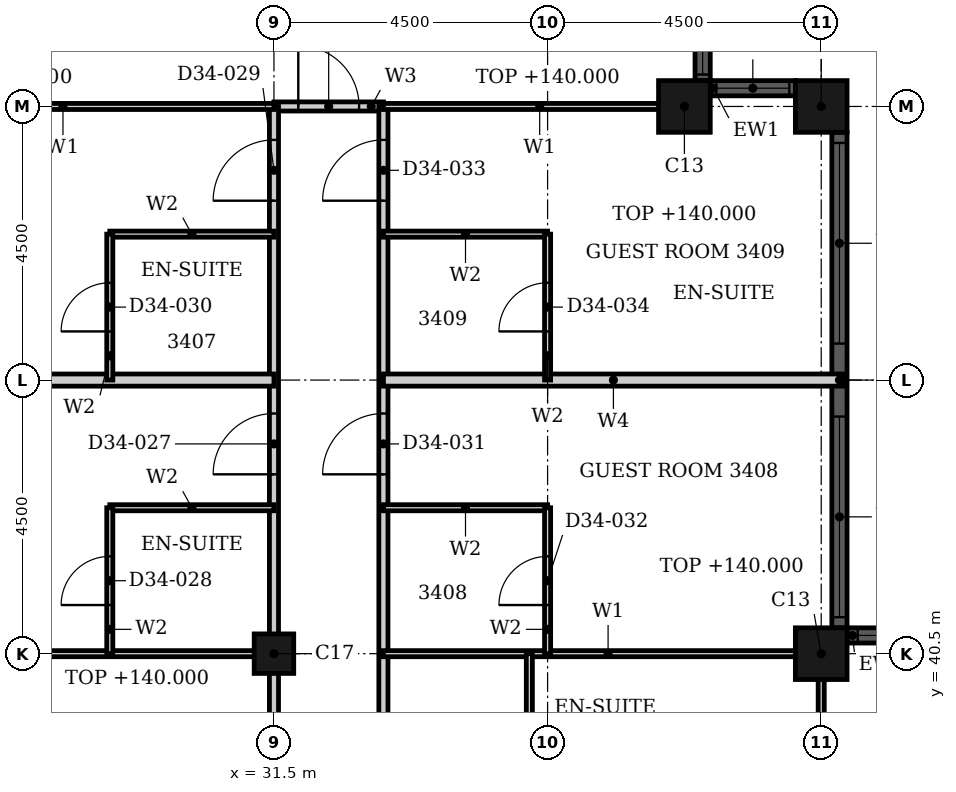
"""IFC4 building model, lengths in metres.
Left out: names, types, materials, properties, quantities, classifications, styles, units other than length and angle.
Written with IfcOpenShell. Run it as: python <this file> out.ifc"""

import sys

from ifc_helpers import new_model, si_unit, direction, frame, frame_2d, origin, origin_2d, place, context, subcontext, project, spatial, rectangle, hollow_rectangle, extrude, element, fill, save


model = new_model("IFC4")
c1 = context("Model", 3, precision=1e-05, world=origin(), true_north=direction((0.0, 1.0)))
c2 = subcontext(c1, "Body", "Model", "MODEL_VIEW")
j1 = project(units=[si_unit("LENGTHUNIT", "METRE"), si_unit("PLANEANGLEUNIT", "RADIAN")], contexts=[c1])
p1 = place(None, origin())
s1 = spatial("IfcSite", under=j1, at=p1, CompositionType="ELEMENT")
p2 = place(p1, origin())
s2 = spatial("IfcBuilding", under=s1, at=p2, CompositionType="ELEMENT")
p3 = place(p2, frame((0.0, 0.0, 136.8)))
s3 = spatial("IfcBuildingStorey", under=s2, at=p3, CompositionType="ELEMENT", Elevation=136.8)
for number, where, z_axis, x_axis in (
    (1, (40.5, 40.5, 0.0), (0.0, 0.0, 1.0), (1.0, 0.0, 0.0)),
    (2, (40.5, 49.5, 0.0), (0.0, 0.0, 1.0), (1.0, 0.0, 0.0)),
    (3, (38.25, 49.5, 0.0), (0.0, 0.0, 1.0), (1.0, 0.0, 0.0)),
):
    element("IfcColumn", number, at=place(p3, frame(where, z_axis=z_axis, x_axis=x_axis)), inside=s3, PredefinedType="COLUMN", context=c2, shape_type="SweptSolid", body=[
        extrude(hollow_rectangle(XDim=0.85, YDim=0.85, WallThickness=0.026, at=origin_2d()), origin(), (0.0, 0.0, 1.0), 3.2),
    ])
p4 = place(p3, frame((31.5, 40.5, 0.0), z_axis=(0.0, 0.0, 1.0), x_axis=(1.0, 0.0, 0.0)))
e4 = element("IfcColumn", 4, at=p4, inside=s3, PredefinedType="COLUMN", context=c2, shape_type="SweptSolid", body=[
    extrude(hollow_rectangle(XDim=0.65, YDim=0.65, WallThickness=0.021, at=origin_2d()), origin(), (0.0, 0.0, 1.0), 3.2),
])
p5 = place(p3, frame((44.575, 40.8, 0.0), z_axis=(0.0, 0.0, 1.0), x_axis=(-1.0, 0.0, 0.0)))
e5 = element("IfcWall", 5, at=p5, inside=s3, PredefinedType="SOLIDWALL", context=c2, shape_type="SweptSolid", body=[
    extrude(rectangle(XDim=3.65, YDim=0.25, at=frame_2d((1.825, 0.0))), origin(), (0.0, 0.0, 1.0), 3.6),
])
p6 = place(p5, frame((0.175, 0.0, 0.9)))
e6 = element("IfcOpeningElement", 6, at=p6, cuts=e5, PredefinedType="OPENING", context=c2, shape_type="SweptSolid", body=[
    extrude(rectangle(XDim=3.3, YDim=1.35, at=frame_2d((1.65, 0.675))), frame((0.0, 0.135, 0.0), z_axis=(0.0, -1.0, 0.0), x_axis=(1.0, 0.0, 0.0)), (0.0, 0.0, 1.0), 0.27),
])
p7 = place(p3, frame((40.8, 40.925, 0.0), z_axis=(0.0, 0.0, 1.0), x_axis=(0.0, 1.0, 0.0)))
e7 = element("IfcWall", 7, at=p7, inside=s3, PredefinedType="SOLIDWALL", context=c2, shape_type="SweptSolid", body=[
    extrude(rectangle(XDim=8.15, YDim=0.25, at=frame_2d((4.075, 0.0))), origin(), (0.0, 0.0, 1.0), 3.6),
])
p8 = place(p7, frame((0.175, 0.0, 0.9)))
e8 = element("IfcOpeningElement", 8, at=p8, cuts=e7, PredefinedType="OPENING", context=c2, shape_type="SweptSolid", body=[
    extrude(rectangle(XDim=3.3, YDim=2.08, at=frame_2d((1.65, 1.04))), frame((0.0, 0.135, 0.0), z_axis=(0.0, -1.0, 0.0), x_axis=(1.0, 0.0, 0.0)), (0.0, 0.0, 1.0), 0.27),
])
p9 = place(p7, frame((4.675, 0.0, 0.9)))
e9 = element("IfcOpeningElement", 9, at=p9, cuts=e7, PredefinedType="OPENING", context=c2, shape_type="SweptSolid", body=[
    extrude(rectangle(XDim=3.3, YDim=2.08, at=frame_2d((1.65, 1.04))), frame((0.0, 0.135, 0.0), z_axis=(0.0, -1.0, 0.0), x_axis=(1.0, 0.0, 0.0)), (0.0, 0.0, 1.0), 0.27),
])
p10 = place(p3, frame((40.075, 49.8, 0.0), z_axis=(0.0, 0.0, 1.0), x_axis=(-1.0, 0.0, 0.0)))
e10 = element("IfcWall", 10, at=p10, inside=s3, PredefinedType="SOLIDWALL", context=c2, shape_type="SweptSolid", body=[
    extrude(rectangle(XDim=1.4, YDim=0.25, at=frame_2d((0.7, 0.0))), origin(), (0.0, 0.0, 1.0), 3.6),
])
p11 = place(p10, frame((0.1, 0.0, 0.9)))
e11 = element("IfcOpeningElement", 11, at=p11, cuts=e10, PredefinedType="OPENING", context=c2, shape_type="SweptSolid", body=[
    extrude(rectangle(XDim=1.2, YDim=2.08, at=frame_2d((0.6, 1.04))), frame((0.0, 0.135, 0.0), z_axis=(0.0, -1.0, 0.0), x_axis=(1.0, 0.0, 0.0)), (0.0, 0.0, 1.0), 0.27),
])
p12 = place(p3, frame((38.55, 49.925, 0.0), z_axis=(0.0, 0.0, 1.0), x_axis=(0.0, 1.0, 0.0)))
e12 = element("IfcWall", 12, at=p12, inside=s3, PredefinedType="SOLIDWALL", context=c2, shape_type="SweptSolid", body=[
    extrude(rectangle(XDim=1.4, YDim=0.25, at=frame_2d((0.7, 0.0))), origin(), (0.0, 0.0, 1.0), 3.6),
])
p13 = place(p12, frame((0.1, 0.0, 0.9)))
e13 = element("IfcOpeningElement", 13, at=p13, cuts=e12, PredefinedType="OPENING", context=c2, shape_type="SweptSolid", body=[
    extrude(rectangle(XDim=1.2, YDim=2.08, at=frame_2d((0.6, 1.04))), frame((0.0, 0.135, 0.0), z_axis=(0.0, -1.0, 0.0), x_axis=(1.0, 0.0, 0.0)), (0.0, 0.0, 1.0), 0.27),
])
p14 = place(p3, frame((31.5, 49.5, 0.0), z_axis=(0.0, 0.0, 1.0), x_axis=(1.0, 0.0, 0.0)))
e14 = element("IfcWall", 14, at=p14, inside=s3, PredefinedType="PARTITIONING", context=c2, shape_type="SweptSolid", body=[
    extrude(rectangle(XDim=1.8, YDim=0.15, at=frame_2d((0.9, 0.0))), origin(), (0.0, 0.0, 1.0), 3.2),
])
p15 = place(p14, frame((0.4, 0.0, 0.0)))
e15 = element("IfcOpeningElement", 15, at=p15, cuts=e14, PredefinedType="OPENING", context=c2, shape_type="SweptSolid", body=[
    extrude(rectangle(XDim=1.0, YDim=2.1, at=frame_2d((0.5, 1.05))), frame((0.0, 0.085, 0.0), z_axis=(0.0, -1.0, 0.0), x_axis=(1.0, 0.0, 0.0)), (0.0, 0.0, 1.0), 0.17),
])
p16 = place(p3, frame((31.5, 33.3, 0.0), z_axis=(0.0, 0.0, 1.0), x_axis=(0.0, 1.0, 0.0)))
e16 = element("IfcWall", 16, at=p16, inside=s3, PredefinedType="PARTITIONING", context=c2, shape_type="SweptSolid", body=[
    extrude(rectangle(XDim=16.2, YDim=0.15, at=frame_2d((8.1, 0.0))), origin(), (0.0, 0.0, 1.0), 2.48),
])
p17 = place(p16, frame((10.15, 0.0, 0.0)))
e17 = element("IfcOpeningElement", 17, at=p17, cuts=e16, PredefinedType="OPENING", context=c2, shape_type="SweptSolid", body=[
    extrude(rectangle(XDim=1.0, YDim=2.1, at=frame_2d((0.5, 1.05))), frame((0.0, 0.085, 0.0), z_axis=(0.0, -1.0, 0.0), x_axis=(1.0, 0.0, 0.0)), (0.0, 0.0, 1.0), 0.17),
])
p18 = place(p16, frame((14.65, 0.0, 0.0)))
e18 = element("IfcOpeningElement", 18, at=p18, cuts=e16, PredefinedType="OPENING", context=c2, shape_type="SweptSolid", body=[
    extrude(rectangle(XDim=1.0, YDim=2.1, at=frame_2d((0.5, 1.05))), frame((0.0, 0.085, 0.0), z_axis=(0.0, -1.0, 0.0), x_axis=(1.0, 0.0, 0.0)), (0.0, 0.0, 1.0), 0.17),
])
p19 = place(p3, frame((33.3, 33.3, 0.0), z_axis=(0.0, 0.0, 1.0), x_axis=(0.0, 1.0, 0.0)))
e19 = element("IfcWall", 19, at=p19, inside=s3, PredefinedType="PARTITIONING", context=c2, shape_type="SweptSolid", body=[
    extrude(rectangle(XDim=16.2, YDim=0.15, at=frame_2d((8.1, 0.0))), origin(), (0.0, 0.0, 1.0), 3.2),
])
p20 = place(p19, frame((10.15, 0.0, 0.0)))
e20 = element("IfcOpeningElement", 20, at=p20, cuts=e19, PredefinedType="OPENING", context=c2, shape_type="SweptSolid", body=[
    extrude(rectangle(XDim=1.0, YDim=2.1, at=frame_2d((0.5, 1.05))), frame((0.0, 0.085, 0.0), z_axis=(0.0, -1.0, 0.0), x_axis=(1.0, 0.0, 0.0)), (0.0, 0.0, 1.0), 0.17),
])
p21 = place(p19, frame((14.65, 0.0, 0.0)))
e21 = element("IfcOpeningElement", 21, at=p21, cuts=e19, PredefinedType="OPENING", context=c2, shape_type="SweptSolid", body=[
    extrude(rectangle(XDim=1.0, YDim=2.1, at=frame_2d((0.5, 1.05))), frame((0.0, 0.085, 0.0), z_axis=(0.0, -1.0, 0.0), x_axis=(1.0, 0.0, 0.0)), (0.0, 0.0, 1.0), 0.17),
])
p22 = place(p3, frame((33.3, 40.5, 0.0), z_axis=(0.0, 0.0, 1.0), x_axis=(1.0, 0.0, 0.0)))
e22 = element("IfcWall", 22, at=p22, inside=s3, PredefinedType="PARTITIONING", context=c2, shape_type="SweptSolid", body=[
    extrude(rectangle(XDim=7.39, YDim=0.1, at=frame_2d((3.695, 0.0))), origin(), (0.0, 0.0, 1.0), 2.268),
])
p23 = place(p3, frame((22.31, 40.5, 0.0), z_axis=(0.0, 0.0, 1.0), x_axis=(1.0, 0.0, 0.0)))
e23 = element("IfcWall", 23, at=p23, inside=s3, PredefinedType="PARTITIONING", context=c2, shape_type="SweptSolid", body=[
    extrude(rectangle(XDim=9.19, YDim=0.1, at=frame_2d((4.595, 0.0))), origin(), (0.0, 0.0, 1.0), 2.268),
])
p24 = place(p3, frame((33.3, 49.5, 0.0), z_axis=(0.0, 0.0, 1.0), x_axis=(1.0, 0.0, 0.0)))
e24 = element("IfcWall", 24, at=p24, inside=s3, PredefinedType="PARTITIONING", context=c2, shape_type="SweptSolid", body=[
    extrude(rectangle(XDim=5.14, YDim=0.1, at=frame_2d((2.57, 0.0))), origin(), (0.0, 0.0, 1.0), 3.2),
])
p25 = place(p3, frame((24.56, 49.5, 0.0), z_axis=(0.0, 0.0, 1.0), x_axis=(1.0, 0.0, 0.0)))
e25 = element("IfcWall", 25, at=p25, inside=s3, PredefinedType="PARTITIONING", context=c2, shape_type="SweptSolid", body=[
    extrude(rectangle(XDim=6.94, YDim=0.1, at=frame_2d((3.47, 0.0))), origin(), (0.0, 0.0, 1.0), 3.2),
])
p26 = place(p3, frame((35.7, 33.3, 0.0), z_axis=(0.0, 0.0, 1.0), x_axis=(0.0, 1.0, 0.0)))
e26 = element("IfcWall", 26, at=p26, inside=s3, PredefinedType="PARTITIONING", context=c2, shape_type="SweptSolid", body=[
    extrude(rectangle(XDim=7.2, YDim=0.1, at=frame_2d((3.6, 0.0))), origin(), (0.0, 0.0, 1.0), 3.2),
])
p27 = place(p3, frame((40.5, 33.3, 0.0), z_axis=(0.0, 0.0, 1.0), x_axis=(0.0, 1.0, 0.0)))
e27 = element("IfcWall", 27, at=p27, inside=s3, PredefinedType="PARTITIONING", context=c2, shape_type="SweptSolid", body=[
    extrude(rectangle(XDim=7.39, YDim=0.1, at=frame_2d((3.695, 0.0))), origin(), (0.0, 0.0, 1.0), 3.2),
])
p28 = place(p3, frame((33.3, 45.0, 0.0), z_axis=(0.0, 0.0, 1.0), x_axis=(1.0, 0.0, 0.0)))
e28 = element("IfcWall", 28, at=p28, inside=s3, PredefinedType="PARTITIONING", context=c2, shape_type="SweptSolid", body=[
    extrude(rectangle(XDim=7.565, YDim=0.2, at=frame_2d((3.782, 0.0))), origin(), (0.0, 0.0, 1.0), 3.2),
])
p29 = place(p3, frame((22.135, 45.0, 0.0), z_axis=(0.0, 0.0, 1.0), x_axis=(1.0, 0.0, 0.0)))
e29 = element("IfcWall", 29, at=p29, inside=s3, PredefinedType="PARTITIONING", context=c2, shape_type="SweptSolid", body=[
    extrude(rectangle(XDim=9.365, YDim=0.2, at=frame_2d((4.683, 0.0))), origin(), (0.0, 0.0, 1.0), 3.2),
])
for number, where, z_axis, x_axis in (
    (30, (33.3, 42.9, 0.0), (0.0, 0.0, 1.0), (1.0, 0.0, 0.0)),
    (31, (28.8, 42.9, 0.0), (0.0, 0.0, 1.0), (1.0, 0.0, 0.0)),
    (32, (33.3, 47.4, 0.0), (0.0, 0.0, 1.0), (1.0, 0.0, 0.0)),
    (33, (28.8, 47.4, 0.0), (0.0, 0.0, 1.0), (1.0, 0.0, 0.0)),
):
    element("IfcWall", number, at=place(p3, frame(where, z_axis=z_axis, x_axis=x_axis)), inside=s3, PredefinedType="PARTITIONING", context=c2, shape_type="SweptSolid", body=[
        extrude(rectangle(XDim=2.7, YDim=0.1, at=frame_2d((1.35, 0.0))), origin(), (0.0, 0.0, 1.0), 3.2),
    ])
p30 = place(p3, frame((28.8, 40.5, 0.0), z_axis=(0.0, 0.0, 1.0), x_axis=(0.0, 1.0, 0.0)))
e34 = element("IfcWall", 34, at=p30, inside=s3, PredefinedType="PARTITIONING", context=c2, shape_type="SweptSolid", body=[
    extrude(rectangle(XDim=2.4, YDim=0.1, at=frame_2d((1.2, 0.0))), origin(), (0.0, 0.0, 1.0), 3.2),
])
p31 = place(p30, frame((0.8, 0.0, 0.0)))
e35 = element("IfcOpeningElement", 35, at=p31, cuts=e34, PredefinedType="OPENING", context=c2, shape_type="SweptSolid", body=[
    extrude(rectangle(XDim=0.8, YDim=2.1, at=frame_2d((0.4, 1.05))), frame((0.0, 0.06, 0.0), z_axis=(0.0, -1.0, 0.0), x_axis=(1.0, 0.0, 0.0)), (0.0, 0.0, 1.0), 0.12),
])
p32 = place(p3, frame((28.8, 45.0, 0.0), z_axis=(0.0, 0.0, 1.0), x_axis=(0.0, 1.0, 0.0)))
e36 = element("IfcWall", 36, at=p32, inside=s3, PredefinedType="PARTITIONING", context=c2, shape_type="SweptSolid", body=[
    extrude(rectangle(XDim=2.4, YDim=0.1, at=frame_2d((1.2, 0.0))), origin(), (0.0, 0.0, 1.0), 3.2),
])
p33 = place(p32, frame((0.8, 0.0, 0.0)))
e37 = element("IfcOpeningElement", 37, at=p33, cuts=e36, PredefinedType="OPENING", context=c2, shape_type="SweptSolid", body=[
    extrude(rectangle(XDim=0.8, YDim=2.1, at=frame_2d((0.4, 1.05))), frame((0.0, 0.06, 0.0), z_axis=(0.0, -1.0, 0.0), x_axis=(1.0, 0.0, 0.0)), (0.0, 0.0, 1.0), 0.12),
])
p34 = place(p3, frame((36.0, 40.5, 0.0), z_axis=(0.0, 0.0, 1.0), x_axis=(0.0, 1.0, 0.0)))
e38 = element("IfcWall", 38, at=p34, inside=s3, PredefinedType="PARTITIONING", context=c2, shape_type="SweptSolid", body=[
    extrude(rectangle(XDim=2.4, YDim=0.1, at=frame_2d((1.2, 0.0))), origin(), (0.0, 0.0, 1.0), 2.48),
])
p35 = place(p34, frame((0.8, 0.0, 0.0)))
e39 = element("IfcOpeningElement", 39, at=p35, cuts=e38, PredefinedType="OPENING", context=c2, shape_type="SweptSolid", body=[
    extrude(rectangle(XDim=0.8, YDim=2.1, at=frame_2d((0.4, 1.05))), frame((0.0, 0.06, 0.0), z_axis=(0.0, -1.0, 0.0), x_axis=(1.0, 0.0, 0.0)), (0.0, 0.0, 1.0), 0.12),
])
p36 = place(p3, frame((36.0, 45.0, 0.0), z_axis=(0.0, 0.0, 1.0), x_axis=(0.0, 1.0, 0.0)))
e40 = element("IfcWall", 40, at=p36, inside=s3, PredefinedType="PARTITIONING", context=c2, shape_type="SweptSolid", body=[
    extrude(rectangle(XDim=2.4, YDim=0.1, at=frame_2d((1.2, 0.0))), origin(), (0.0, 0.0, 1.0), 2.48),
])
p37 = place(p36, frame((0.8, 0.0, 0.0)))
e41 = element("IfcOpeningElement", 41, at=p37, cuts=e40, PredefinedType="OPENING", context=c2, shape_type="SweptSolid", body=[
    extrude(rectangle(XDim=0.8, YDim=2.1, at=frame_2d((0.4, 1.05))), frame((0.0, 0.06, 0.0), z_axis=(0.0, -1.0, 0.0), x_axis=(1.0, 0.0, 0.0)), (0.0, 0.0, 1.0), 0.12),
])
p38 = place(p6, origin())
e42 = element("IfcWindow", 42, at=p38, inside=s3, PartitioningType="SINGLE_PANEL", PredefinedType="WINDOW", context=c2, shape_type="SweptSolid", body=[
    extrude(rectangle(XDim=3.3, YDim=1.35, at=frame_2d((1.65, 0.675))), frame((0.0, 0.03, 0.0), z_axis=(0.0, -1.0, 0.0), x_axis=(1.0, 0.0, 0.0)), (0.0, 0.0, 1.0), 0.06),
])
fill(e6, e42)
p39 = place(p8, origin())
e43 = element("IfcWindow", 43, at=p39, inside=s3, PartitioningType="SINGLE_PANEL", PredefinedType="WINDOW", context=c2, shape_type="SweptSolid", body=[
    extrude(rectangle(XDim=3.3, YDim=2.08, at=frame_2d((1.65, 1.04))), frame((0.0, 0.03, 0.0), z_axis=(0.0, -1.0, 0.0), x_axis=(1.0, 0.0, 0.0)), (0.0, 0.0, 1.0), 0.06),
])
fill(e8, e43)
p40 = place(p9, origin())
e44 = element("IfcWindow", 44, at=p40, inside=s3, PartitioningType="SINGLE_PANEL", PredefinedType="WINDOW", context=c2, shape_type="SweptSolid", body=[
    extrude(rectangle(XDim=3.3, YDim=2.08, at=frame_2d((1.65, 1.04))), frame((0.0, 0.03, 0.0), z_axis=(0.0, -1.0, 0.0), x_axis=(1.0, 0.0, 0.0)), (0.0, 0.0, 1.0), 0.06),
])
fill(e9, e44)
p41 = place(p11, origin())
e45 = element("IfcWindow", 45, at=p41, inside=s3, PartitioningType="SINGLE_PANEL", PredefinedType="WINDOW", context=c2, shape_type="SweptSolid", body=[
    extrude(rectangle(XDim=1.2, YDim=2.08, at=frame_2d((0.6, 1.04))), frame((0.0, 0.03, 0.0), z_axis=(0.0, -1.0, 0.0), x_axis=(1.0, 0.0, 0.0)), (0.0, 0.0, 1.0), 0.06),
])
fill(e11, e45)
p42 = place(p13, origin())
e46 = element("IfcWindow", 46, at=p42, inside=s3, PartitioningType="SINGLE_PANEL", PredefinedType="WINDOW", context=c2, shape_type="SweptSolid", body=[
    extrude(rectangle(XDim=1.2, YDim=2.08, at=frame_2d((0.6, 1.04))), frame((0.0, 0.03, 0.0), z_axis=(0.0, -1.0, 0.0), x_axis=(1.0, 0.0, 0.0)), (0.0, 0.0, 1.0), 0.06),
])
fill(e13, e46)
p43 = place(p17, origin())
e47 = element("IfcDoor", 47, at=p43, inside=s3, OperationType="SINGLE_SWING_RIGHT", PredefinedType="DOOR", context=c2, shape_type="SweptSolid", body=[
    extrude(rectangle(XDim=1.0, YDim=2.1, at=frame_2d((0.5, 1.05))), frame((0.0, 0.025, 0.0), z_axis=(0.0, -1.0, 0.0), x_axis=(1.0, 0.0, 0.0)), (0.0, 0.0, 1.0), 0.05),
])
fill(e17, e47)
p44 = place(p31, origin())
e48 = element("IfcDoor", 48, at=p44, inside=s3, OperationType="SINGLE_SWING_LEFT", PredefinedType="DOOR", context=c2, shape_type="SweptSolid", body=[
    extrude(rectangle(XDim=0.8, YDim=2.1, at=frame_2d((0.4, 1.05))), frame((0.0, 0.025, 0.0), z_axis=(0.0, -1.0, 0.0), x_axis=(1.0, 0.0, 0.0)), (0.0, 0.0, 1.0), 0.05),
])
fill(e35, e48)
p45 = place(p18, origin())
e49 = element("IfcDoor", 49, at=p45, inside=s3, OperationType="SINGLE_SWING_RIGHT", PredefinedType="DOOR", context=c2, shape_type="SweptSolid", body=[
    extrude(rectangle(XDim=1.0, YDim=2.1, at=frame_2d((0.5, 1.05))), frame((0.0, 0.025, 0.0), z_axis=(0.0, -1.0, 0.0), x_axis=(1.0, 0.0, 0.0)), (0.0, 0.0, 1.0), 0.05),
])
fill(e18, e49)
p46 = place(p33, origin())
e50 = element("IfcDoor", 50, at=p46, inside=s3, OperationType="SINGLE_SWING_LEFT", PredefinedType="DOOR", context=c2, shape_type="SweptSolid", body=[
    extrude(rectangle(XDim=0.8, YDim=2.1, at=frame_2d((0.4, 1.05))), frame((0.0, 0.025, 0.0), z_axis=(0.0, -1.0, 0.0), x_axis=(1.0, 0.0, 0.0)), (0.0, 0.0, 1.0), 0.05),
])
fill(e37, e50)
p47 = place(p20, origin())
e51 = element("IfcDoor", 51, at=p47, inside=s3, OperationType="SINGLE_SWING_RIGHT", PredefinedType="DOOR", context=c2, shape_type="SweptSolid", body=[
    extrude(rectangle(XDim=1.0, YDim=2.1, at=frame_2d((0.5, 1.05))), frame((0.0, 0.025, 0.0), z_axis=(0.0, -1.0, 0.0), x_axis=(1.0, 0.0, 0.0)), (0.0, 0.0, 1.0), 0.05),
])
fill(e20, e51)
p48 = place(p35, origin())
e52 = element("IfcDoor", 52, at=p48, inside=s3, OperationType="SINGLE_SWING_RIGHT", PredefinedType="DOOR", context=c2, shape_type="SweptSolid", body=[
    extrude(rectangle(XDim=0.8, YDim=2.1, at=frame_2d((0.4, 1.05))), frame((0.0, 0.025, 0.0), z_axis=(0.0, -1.0, 0.0), x_axis=(1.0, 0.0, 0.0)), (0.0, 0.0, 1.0), 0.05),
])
fill(e39, e52)
p49 = place(p21, origin())
e53 = element("IfcDoor", 53, at=p49, inside=s3, OperationType="SINGLE_SWING_RIGHT", PredefinedType="DOOR", context=c2, shape_type="SweptSolid", body=[
    extrude(rectangle(XDim=1.0, YDim=2.1, at=frame_2d((0.5, 1.05))), frame((0.0, 0.025, 0.0), z_axis=(0.0, -1.0, 0.0), x_axis=(1.0, 0.0, 0.0)), (0.0, 0.0, 1.0), 0.05),
])
fill(e21, e53)
p50 = place(p37, origin())
e54 = element("IfcDoor", 54, at=p50, inside=s3, OperationType="SINGLE_SWING_LEFT", PredefinedType="DOOR", context=c2, shape_type="SweptSolid", body=[
    extrude(rectangle(XDim=0.8, YDim=2.1, at=frame_2d((0.4, 1.05))), frame((0.0, 0.025, 0.0), z_axis=(0.0, -1.0, 0.0), x_axis=(1.0, 0.0, 0.0)), (0.0, 0.0, 1.0), 0.05),
])
fill(e41, e54)
p51 = place(p15, origin())
e55 = element("IfcDoor", 55, at=p51, inside=s3, OperationType="SINGLE_SWING_RIGHT", PredefinedType="DOOR", context=c2, shape_type="SweptSolid", body=[
    extrude(rectangle(XDim=1.0, YDim=2.1, at=frame_2d((0.5, 1.05))), frame((0.0, 0.025, 0.0), z_axis=(0.0, -1.0, 0.0), x_axis=(1.0, 0.0, 0.0)), (0.0, 0.0, 1.0), 0.05),
])
fill(e15, e55)
save(model, sys.argv[1])
